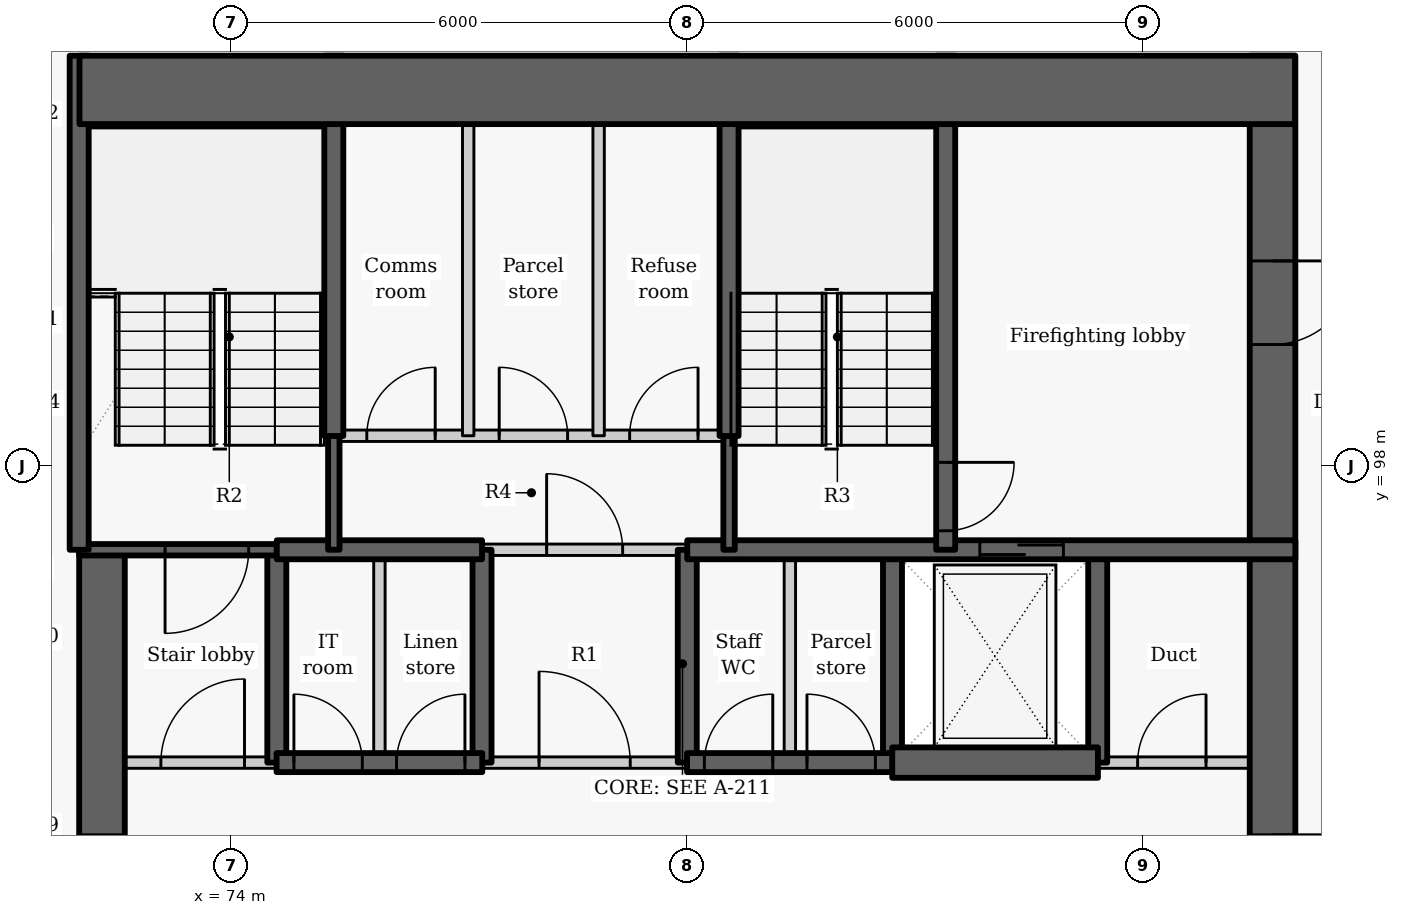
"""IFC4 building model, lengths in metres.
Left out: names, types, materials, properties, quantities, classifications, styles, units other than length and angle.
Written with IfcOpenShell. Run it as: python <this file> out.ifc"""

import sys

from ifc_helpers import new_model, si_unit, direction, frame, frame_2d, origin, place, context, subcontext, project, spatial, rectangle, extrude, element, fill, save


model = new_model("IFC4")
c1 = context("Model", 3, precision=1e-05, world=origin(), true_north=direction((0.0, 1.0)))
c2 = subcontext(c1, "Body", "Model", "MODEL_VIEW")
j1 = project(units=[si_unit("LENGTHUNIT", "METRE"), si_unit("PLANEANGLEUNIT", "RADIAN")], contexts=[c1])
p1 = place(None, origin())
s1 = spatial("IfcSite", under=j1, at=p1, CompositionType="ELEMENT")
p2 = place(p1, origin())
s2 = spatial("IfcBuilding", under=s1, at=p2, CompositionType="ELEMENT")
p3 = place(p2, frame((0.0, 0.0, 41.4)))
s3 = spatial("IfcBuildingStorey", under=s2, at=p3, CompositionType="ELEMENT", Elevation=41.4)
p4 = place(p3, frame((74.6, 94.1, -0.275), z_axis=(0.0, 0.0, 1.0), x_axis=(0.0, 1.0, 0.0)))
e1 = element("IfcWall", 1, at=p4, inside=s3, PredefinedType="SHEAR", context=c2, shape_type="SweptSolid", body=[
    extrude(rectangle(XDim=2.8, YDim=0.25, at=frame_2d((1.4, 0.0))), origin(), (0.0, 0.0, 1.0), 3.3),
])
p5 = place(p3, frame((72.3, 87.8, -0.275), z_axis=(0.0, 0.0, 1.0), x_axis=(0.0, 1.0, 0.0)))
e2 = element("IfcWall", 2, at=p5, inside=s3, PredefinedType="SHEAR", context=c2, shape_type="SweptSolid", body=[
    extrude(rectangle(XDim=9.1, YDim=0.6, at=frame_2d((4.55, 0.0))), origin(), (0.0, 0.0, 1.0), 3.3),
])
p6 = place(p5, frame((3.85, 0.0, 0.275)))
e3 = element("IfcOpeningElement", 3, at=p6, cuts=e2, PredefinedType="OPENING", context=c2, shape_type="SweptSolid", body=[
    extrude(rectangle(XDim=1.5, YDim=2.1, at=frame_2d((0.75, 1.05))), frame((0.0, 0.31, 0.0), z_axis=(0.0, -1.0, 0.0), x_axis=(1.0, 0.0, 0.0)), (0.0, 0.0, 1.0), 0.62),
])
for number, where, z_axis, x_axis in (
    (4, (77.3, 94.1, -0.275), (0.0, 0.0, 1.0), (0.0, 1.0, 0.0)),
    (5, (80.0, 94.1, -0.275), (0.0, 0.0, 1.0), (0.0, 1.0, 0.0)),
    (6, (82.7, 94.1, -0.275), (0.0, 0.0, 1.0), (0.0, 1.0, 0.0)),
    (7, (85.4, 94.1, -0.275), (0.0, 0.0, 1.0), (0.0, 1.0, 0.0)),
):
    element("IfcWall", number, at=place(p3, frame(where, z_axis=z_axis, x_axis=x_axis)), inside=s3, PredefinedType="SHEAR", context=c2, shape_type="SweptSolid", body=[
        extrude(rectangle(XDim=2.8, YDim=0.25, at=frame_2d((1.4, 0.0))), origin(), (0.0, 0.0, 1.0), 3.3),
    ])
p7 = place(p3, frame((87.7, 103.4, -0.275), z_axis=(0.0, 0.0, 1.0), x_axis=(0.0, -1.0, 0.0)))
e8 = element("IfcWall", 8, at=p7, inside=s3, PredefinedType="SHEAR", context=c2, shape_type="SweptSolid", body=[
    extrude(rectangle(XDim=15.6, YDim=0.6, at=frame_2d((7.8, 0.0))), origin(), (0.0, 0.0, 1.0), 3.3),
])
p8 = place(p7, frame((10.25, 0.0, 0.275)))
e9 = element("IfcOpeningElement", 9, at=p8, cuts=e8, PredefinedType="OPENING", context=c2, shape_type="SweptSolid", body=[
    extrude(rectangle(XDim=1.5, YDim=2.1, at=frame_2d((0.75, 1.05))), frame((0.0, 0.31, 0.0), z_axis=(0.0, -1.0, 0.0), x_axis=(1.0, 0.0, 0.0)), (0.0, 0.0, 1.0), 0.62),
])
p9 = place(p7, frame((2.7, 0.0, 0.275)))
e10 = element("IfcOpeningElement", 10, at=p9, cuts=e8, PredefinedType="OPENING", context=c2, shape_type="SweptSolid", body=[
    extrude(rectangle(XDim=1.1, YDim=2.1, at=frame_2d((0.55, 1.05))), frame((0.0, 0.31, 0.0), z_axis=(0.0, -1.0, 0.0), x_axis=(1.0, 0.0, 0.0)), (0.0, 0.0, 1.0), 0.62),
])
p10 = place(p3, frame((72.0, 94.1, 0.0), z_axis=(0.0, 0.0, 1.0), x_axis=(1.0, 0.0, 0.0)))
e11 = element("IfcWall", 11, at=p10, inside=s3, PredefinedType="PARTITIONING", context=c2, shape_type="SweptSolid", body=[
    extrude(rectangle(XDim=2.603, YDim=0.15, at=frame_2d((1.302, 0.0))), origin(), (0.0, 0.0, 1.0), 3.025),
])
p11 = place(p10, frame((1.075, 0.0, 0.0)))
e12 = element("IfcOpeningElement", 12, at=p11, cuts=e11, PredefinedType="OPENING", context=c2, shape_type="SweptSolid", body=[
    extrude(rectangle(XDim=1.1, YDim=2.1, at=frame_2d((0.55, 1.05))), frame((0.0, 0.085, 0.0), z_axis=(0.0, -1.0, 0.0), x_axis=(1.0, 0.0, 0.0)), (0.0, 0.0, 1.0), 0.17),
])
p12 = place(p3, frame((77.297, 94.1, 0.0), z_axis=(0.0, 0.0, 1.0), x_axis=(1.0, 0.0, 0.0)))
e13 = element("IfcWall", 13, at=p12, inside=s3, PredefinedType="PARTITIONING", context=c2, shape_type="SweptSolid", body=[
    extrude(rectangle(XDim=2.706, YDim=0.15, at=frame_2d((1.353, 0.0))), origin(), (0.0, 0.0, 1.0), 3.025),
])
p13 = place(p12, frame((0.753, 0.0, 0.0)))
e14 = element("IfcOpeningElement", 14, at=p13, cuts=e13, PredefinedType="OPENING", context=c2, shape_type="SweptSolid", body=[
    extrude(rectangle(XDim=1.2, YDim=2.1, at=frame_2d((0.6, 1.05))), frame((0.0, 0.085, 0.0), z_axis=(0.0, -1.0, 0.0), x_axis=(1.0, 0.0, 0.0)), (0.0, 0.0, 1.0), 0.17),
])
p14 = place(p3, frame((85.397, 94.1, 0.0), z_axis=(0.0, 0.0, 1.0), x_axis=(1.0, 0.0, 0.0)))
e15 = element("IfcWall", 15, at=p14, inside=s3, PredefinedType="PARTITIONING", context=c2, shape_type="SweptSolid", body=[
    extrude(rectangle(XDim=2.603, YDim=0.15, at=frame_2d((1.302, 0.0))), origin(), (0.0, 0.0, 1.0), 3.025),
])
p15 = place(p14, frame((0.528, 0.0, 0.0)))
e16 = element("IfcOpeningElement", 16, at=p15, cuts=e15, PredefinedType="OPENING", context=c2, shape_type="SweptSolid", body=[
    extrude(rectangle(XDim=0.9, YDim=2.1, at=frame_2d((0.45, 1.05))), frame((0.0, 0.085, 0.0), z_axis=(0.0, -1.0, 0.0), x_axis=(1.0, 0.0, 0.0)), (0.0, 0.0, 1.0), 0.17),
])
p16 = place(p3, frame((74.597, 94.1, -0.275), z_axis=(0.0, 0.0, 1.0), x_axis=(1.0, 0.0, 0.0)))
e17 = element("IfcWall", 17, at=p16, inside=s3, PredefinedType="SHEAR", context=c2, shape_type="SweptSolid", body=[
    extrude(rectangle(XDim=2.706, YDim=0.25, at=frame_2d((1.353, 0.0))), origin(), (0.0, 0.0, 1.0), 3.3),
])
p17 = place(p16, frame((0.228, 0.0, 0.275)))
e18 = element("IfcOpeningElement", 18, at=p17, cuts=e17, PredefinedType="OPENING", context=c2, shape_type="SweptSolid", body=[
    extrude(rectangle(XDim=0.9, YDim=2.1, at=frame_2d((0.45, 1.05))), frame((0.0, 0.135, 0.0), z_axis=(0.0, -1.0, 0.0), x_axis=(1.0, 0.0, 0.0)), (0.0, 0.0, 1.0), 0.27),
])
p18 = place(p16, frame((1.578, 0.0, 0.275)))
e19 = element("IfcOpeningElement", 19, at=p18, cuts=e17, PredefinedType="OPENING", context=c2, shape_type="SweptSolid", body=[
    extrude(rectangle(XDim=0.9, YDim=2.1, at=frame_2d((0.45, 1.05))), frame((0.0, 0.135, 0.0), z_axis=(0.0, -1.0, 0.0), x_axis=(1.0, 0.0, 0.0)), (0.0, 0.0, 1.0), 0.27),
])
p19 = place(p3, frame((79.997, 94.1, -0.275), z_axis=(0.0, 0.0, 1.0), x_axis=(1.0, 0.0, 0.0)))
e20 = element("IfcWall", 20, at=p19, inside=s3, PredefinedType="SHEAR", context=c2, shape_type="SweptSolid", body=[
    extrude(rectangle(XDim=2.706, YDim=0.25, at=frame_2d((1.353, 0.0))), origin(), (0.0, 0.0, 1.0), 3.3),
])
p20 = place(p19, frame((0.228, 0.0, 0.275)))
e21 = element("IfcOpeningElement", 21, at=p20, cuts=e20, PredefinedType="OPENING", context=c2, shape_type="SweptSolid", body=[
    extrude(rectangle(XDim=0.9, YDim=2.1, at=frame_2d((0.45, 1.05))), frame((0.0, 0.135, 0.0), z_axis=(0.0, -1.0, 0.0), x_axis=(1.0, 0.0, 0.0)), (0.0, 0.0, 1.0), 0.27),
])
p21 = place(p19, frame((1.578, 0.0, 0.275)))
e22 = element("IfcOpeningElement", 22, at=p21, cuts=e20, PredefinedType="OPENING", context=c2, shape_type="SweptSolid", body=[
    extrude(rectangle(XDim=0.9, YDim=2.1, at=frame_2d((0.45, 1.05))), frame((0.0, 0.135, 0.0), z_axis=(0.0, -1.0, 0.0), x_axis=(1.0, 0.0, 0.0)), (0.0, 0.0, 1.0), 0.27),
])
p22 = place(p3, frame((82.697, 94.1, -0.275), z_axis=(0.0, 0.0, 1.0), x_axis=(1.0, 0.0, 0.0)))
e23 = element("IfcWall", 23, at=p22, inside=s3, PredefinedType="SHEAR", context=c2, shape_type="SweptSolid", body=[
    extrude(rectangle(XDim=2.706, YDim=0.4, at=frame_2d((1.353, 0.0))), origin(), (0.0, 0.0, 1.0), 3.3),
])
p23 = place(p3, frame((74.6, 96.9, -0.275), z_axis=(0.0, 0.0, 1.0), x_axis=(-1.0, 0.0, 0.0)))
e24 = element("IfcWall", 24, at=p23, inside=s3, PredefinedType="SHEAR", context=c2, shape_type="SweptSolid", body=[
    extrude(rectangle(XDim=2.6, YDim=0.15, at=frame_2d((1.3, 0.0))), origin(), (0.0, 0.0, 1.0), 3.3),
])
p24 = place(p23, frame((0.37, 0.0, 0.275)))
e25 = element("IfcOpeningElement", 25, at=p24, cuts=e24, PredefinedType="OPENING", context=c2, shape_type="SweptSolid", body=[
    extrude(rectangle(XDim=1.1, YDim=2.1, at=frame_2d((0.55, 1.05))), frame((0.0, 0.085, 0.0), z_axis=(0.0, -1.0, 0.0), x_axis=(1.0, 0.0, 0.0)), (0.0, 0.0, 1.0), 0.17),
])
p25 = place(p3, frame((75.95, 94.1, 0.0), z_axis=(0.0, 0.0, 1.0), x_axis=(0.0, 1.0, 0.0)))
e26 = element("IfcWall", 26, at=p25, inside=s3, PredefinedType="PARTITIONING", context=c2, shape_type="SweptSolid", body=[
    extrude(rectangle(XDim=2.8, YDim=0.15, at=frame_2d((1.4, 0.0))), origin(), (0.0, 0.0, 1.0), 3.025),
])
p26 = place(p3, frame((74.6, 96.9, -0.275), z_axis=(0.0, 0.0, 1.0), x_axis=(1.0, 0.0, 0.0)))
e27 = element("IfcWall", 27, at=p26, inside=s3, PredefinedType="SHEAR", context=c2, shape_type="SweptSolid", body=[
    extrude(rectangle(XDim=2.7, YDim=0.25, at=frame_2d((1.35, 0.0))), origin(), (0.0, 0.0, 1.0), 3.3),
])
p27 = place(p3, frame((80.0, 96.9, -0.275), z_axis=(0.0, 0.0, 1.0), x_axis=(1.0, 0.0, 0.0)))
e28 = element("IfcWall", 28, at=p27, inside=s3, PredefinedType="SHEAR", context=c2, shape_type="SweptSolid", body=[
    extrude(rectangle(XDim=8.0, YDim=0.25, at=frame_2d((4.0, 0.0))), origin(), (0.0, 0.0, 1.0), 3.3),
])
p28 = place(p27, frame((3.849, 0.0, 0.275)))
e29 = element("IfcOpeningElement", 29, at=p28, cuts=e28, PredefinedType="OPENING", context=c2, shape_type="SweptSolid", body=[
    extrude(rectangle(XDim=1.1, YDim=2.1, at=frame_2d((0.55, 1.05))), frame((0.0, 0.135, 0.0), z_axis=(0.0, -1.0, 0.0), x_axis=(1.0, 0.0, 0.0)), (0.0, 0.0, 1.0), 0.27),
])
p29 = place(p3, frame((77.3, 96.9, 0.0), z_axis=(0.0, 0.0, 1.0), x_axis=(1.0, 0.0, 0.0)))
e30 = element("IfcWall", 30, at=p29, inside=s3, PredefinedType="PARTITIONING", context=c2, shape_type="SweptSolid", body=[
    extrude(rectangle(XDim=2.7, YDim=0.15, at=frame_2d((1.35, 0.0))), origin(), (0.0, 0.0, 1.0), 3.025),
])
p30 = place(p29, frame((0.85, 0.0, 0.0)))
e31 = element("IfcOpeningElement", 31, at=p30, cuts=e30, PredefinedType="OPENING", context=c2, shape_type="SweptSolid", body=[
    extrude(rectangle(XDim=1.0, YDim=2.1, at=frame_2d((0.5, 1.05))), frame((0.0, 0.085, 0.0), z_axis=(0.0, -1.0, 0.0), x_axis=(1.0, 0.0, 0.0)), (0.0, 0.0, 1.0), 0.17),
])
p31 = place(p3, frame((81.35, 94.1, 0.0), z_axis=(0.0, 0.0, 1.0), x_axis=(0.0, 1.0, 0.0)))
e32 = element("IfcWall", 32, at=p31, inside=s3, PredefinedType="PARTITIONING", context=c2, shape_type="SweptSolid", body=[
    extrude(rectangle(XDim=2.8, YDim=0.15, at=frame_2d((1.4, 0.0))), origin(), (0.0, 0.0, 1.0), 3.025),
])
p32 = place(p3, frame((75.35, 96.9, -0.275), z_axis=(0.0, 0.0, 1.0), x_axis=(0.0, 1.0, 0.0)))
e33 = element("IfcWall", 33, at=p32, inside=s3, PredefinedType="SHEAR", context=c2, shape_type="SweptSolid", body=[
    extrude(rectangle(XDim=1.503, YDim=0.15, at=frame_2d((0.751, 0.0))), origin(), (0.0, 0.0, 1.0), 3.3),
])
p33 = place(p3, frame((75.35, 98.397, -0.275), z_axis=(0.0, 0.0, 1.0), x_axis=(0.0, 1.0, 0.0)))
e34 = element("IfcWall", 34, at=p33, inside=s3, PredefinedType="SHEAR", context=c2, shape_type="SweptSolid", body=[
    extrude(rectangle(XDim=5.003, YDim=0.25, at=frame_2d((2.501, 0.0))), origin(), (0.0, 0.0, 1.0), 3.3),
])
p34 = place(p3, frame((72.0, 96.9, -0.275), z_axis=(0.0, 0.0, 1.0), x_axis=(0.0, 1.0, 0.0)))
e35 = element("IfcWall", 35, at=p34, inside=s3, PredefinedType="SHEAR", context=c2, shape_type="SweptSolid", body=[
    extrude(rectangle(XDim=6.5, YDim=0.25, at=frame_2d((3.25, 0.0))), origin(), (0.0, 0.0, 1.0), 3.3),
])
p35 = place(p3, frame((83.4, 103.4, -0.275), z_axis=(0.0, 0.0, 1.0), x_axis=(0.0, -1.0, 0.0)))
e36 = element("IfcWall", 36, at=p35, inside=s3, PredefinedType="SHEAR", context=c2, shape_type="SweptSolid", body=[
    extrude(rectangle(XDim=6.5, YDim=0.25, at=frame_2d((3.25, 0.0))), origin(), (0.0, 0.0, 1.0), 3.3),
])
p36 = place(p35, frame((5.35, 0.0, 0.275)))
e37 = element("IfcOpeningElement", 37, at=p36, cuts=e36, PredefinedType="OPENING", context=c2, shape_type="SweptSolid", body=[
    extrude(rectangle(XDim=0.9, YDim=2.1, at=frame_2d((0.45, 1.05))), frame((0.0, 0.135, 0.0), z_axis=(0.0, -1.0, 0.0), x_axis=(1.0, 0.0, 0.0)), (0.0, 0.0, 1.0), 0.27),
])
p37 = place(p3, frame((80.55, 96.9, -0.275), z_axis=(0.0, 0.0, 1.0), x_axis=(0.0, 1.0, 0.0)))
e38 = element("IfcWall", 38, at=p37, inside=s3, PredefinedType="SHEAR", context=c2, shape_type="SweptSolid", body=[
    extrude(rectangle(XDim=1.503, YDim=0.15, at=frame_2d((0.751, 0.0))), origin(), (0.0, 0.0, 1.0), 3.3),
])
p38 = place(p3, frame((80.55, 98.397, -0.275), z_axis=(0.0, 0.0, 1.0), x_axis=(0.0, 1.0, 0.0)))
e39 = element("IfcWall", 39, at=p38, inside=s3, PredefinedType="SHEAR", context=c2, shape_type="SweptSolid", body=[
    extrude(rectangle(XDim=5.003, YDim=0.25, at=frame_2d((2.501, 0.0))), origin(), (0.0, 0.0, 1.0), 3.3),
])
p39 = place(p3, frame((75.35, 98.4, 0.0), z_axis=(0.0, 0.0, 1.0), x_axis=(1.0, 0.0, 0.0)))
e40 = element("IfcWall", 40, at=p39, inside=s3, PredefinedType="PARTITIONING", context=c2, shape_type="SweptSolid", body=[
    extrude(rectangle(XDim=5.2, YDim=0.15, at=frame_2d((2.6, 0.0))), origin(), (0.0, 0.0, 1.0), 3.025),
])
p40 = place(p39, frame((0.434, 0.0, 0.0)))
e41 = element("IfcOpeningElement", 41, at=p40, cuts=e40, PredefinedType="OPENING", context=c2, shape_type="SweptSolid", body=[
    extrude(rectangle(XDim=0.9, YDim=2.1, at=frame_2d((0.45, 1.05))), frame((0.0, 0.085, 0.0), z_axis=(0.0, -1.0, 0.0), x_axis=(1.0, 0.0, 0.0)), (0.0, 0.0, 1.0), 0.17),
])
p41 = place(p39, frame((2.176, 0.0, 0.0)))
e42 = element("IfcOpeningElement", 42, at=p41, cuts=e40, PredefinedType="OPENING", context=c2, shape_type="SweptSolid", body=[
    extrude(rectangle(XDim=0.9, YDim=2.1, at=frame_2d((0.45, 1.05))), frame((0.0, 0.085, 0.0), z_axis=(0.0, -1.0, 0.0), x_axis=(1.0, 0.0, 0.0)), (0.0, 0.0, 1.0), 0.17),
])
p42 = place(p39, frame((3.892, 0.0, 0.0)))
e43 = element("IfcOpeningElement", 43, at=p42, cuts=e40, PredefinedType="OPENING", context=c2, shape_type="SweptSolid", body=[
    extrude(rectangle(XDim=0.9, YDim=2.1, at=frame_2d((0.45, 1.05))), frame((0.0, 0.085, 0.0), z_axis=(0.0, -1.0, 0.0), x_axis=(1.0, 0.0, 0.0)), (0.0, 0.0, 1.0), 0.17),
])
for number, where, z_axis, x_axis in (
    (44, (77.118, 98.4, 0.0), (0.0, 0.0, 1.0), (0.0, 1.0, 0.0)),
    (45, (78.834, 98.4, 0.0), (0.0, 0.0, 1.0), (0.0, 1.0, 0.0)),
):
    element("IfcWall", number, at=place(p3, frame(where, z_axis=z_axis, x_axis=x_axis)), inside=s3, PredefinedType="PARTITIONING", context=c2, shape_type="SweptSolid", body=[
        extrude(rectangle(XDim=5.0, YDim=0.15, at=frame_2d((2.5, 0.0))), origin(), (0.0, 0.0, 1.0), 3.025),
    ])
p43 = place(p3, frame((72.004, 102.95, -0.275), z_axis=(0.0, 0.0, 1.0), x_axis=(1.0, 0.0, 0.0)))
e46 = element("IfcWall", 46, at=p43, inside=s3, PredefinedType="SHEAR", context=c2, shape_type="SweptSolid", body=[
    extrude(rectangle(XDim=15.992, YDim=0.9, at=frame_2d((7.996, 0.0))), origin(), (0.0, 0.0, 1.0), 3.3),
])
p44 = place(p11, origin())
e47 = element("IfcDoor", 47, at=p44, inside=s3, OperationType="SINGLE_SWING_RIGHT", PredefinedType="DOOR", context=c2, shape_type="SweptSolid", body=[
    extrude(rectangle(XDim=1.1, YDim=2.1, at=frame_2d((0.55, 1.05))), frame((0.0, 0.025, 0.0), z_axis=(0.0, -1.0, 0.0), x_axis=(1.0, 0.0, 0.0)), (0.0, 0.0, 1.0), 0.05),
])
fill(e12, e47)
p45 = place(p17, origin())
e48 = element("IfcDoor", 48, at=p45, inside=s3, OperationType="SINGLE_SWING_LEFT", PredefinedType="DOOR", context=c2, shape_type="SweptSolid", body=[
    extrude(rectangle(XDim=0.9, YDim=2.1, at=frame_2d((0.45, 1.05))), frame((0.0, 0.025, 0.0), z_axis=(0.0, -1.0, 0.0), x_axis=(1.0, 0.0, 0.0)), (0.0, 0.0, 1.0), 0.05),
])
fill(e18, e48)
p46 = place(p18, origin())
e49 = element("IfcDoor", 49, at=p46, inside=s3, OperationType="SINGLE_SWING_RIGHT", PredefinedType="DOOR", context=c2, shape_type="SweptSolid", body=[
    extrude(rectangle(XDim=0.9, YDim=2.1, at=frame_2d((0.45, 1.05))), frame((0.0, 0.025, 0.0), z_axis=(0.0, -1.0, 0.0), x_axis=(1.0, 0.0, 0.0)), (0.0, 0.0, 1.0), 0.05),
])
fill(e19, e49)
p47 = place(p13, origin())
e50 = element("IfcDoor", 50, at=p47, inside=s3, OperationType="DOUBLE_DOOR_SINGLE_SWING", PredefinedType="DOOR", context=c2, shape_type="SweptSolid", body=[
    extrude(rectangle(XDim=1.2, YDim=2.1, at=frame_2d((0.6, 1.05))), frame((0.0, 0.025, 0.0), z_axis=(0.0, -1.0, 0.0), x_axis=(1.0, 0.0, 0.0)), (0.0, 0.0, 1.0), 0.05),
])
fill(e14, e50)
p48 = place(p20, origin())
e51 = element("IfcDoor", 51, at=p48, inside=s3, OperationType="SINGLE_SWING_RIGHT", PredefinedType="DOOR", context=c2, shape_type="SweptSolid", body=[
    extrude(rectangle(XDim=0.9, YDim=2.1, at=frame_2d((0.45, 1.05))), frame((0.0, 0.025, 0.0), z_axis=(0.0, -1.0, 0.0), x_axis=(1.0, 0.0, 0.0)), (0.0, 0.0, 1.0), 0.05),
])
fill(e21, e51)
p49 = place(p21, origin())
e52 = element("IfcDoor", 52, at=p49, inside=s3, OperationType="SINGLE_SWING_LEFT", PredefinedType="DOOR", context=c2, shape_type="SweptSolid", body=[
    extrude(rectangle(XDim=0.9, YDim=2.1, at=frame_2d((0.45, 1.05))), frame((0.0, 0.025, 0.0), z_axis=(0.0, -1.0, 0.0), x_axis=(1.0, 0.0, 0.0)), (0.0, 0.0, 1.0), 0.05),
])
fill(e22, e52)
p50 = place(p28, origin())
e53 = element("IfcDoor", 53, at=p50, inside=s3, OperationType="SLIDING_TO_LEFT", PredefinedType="DOOR", context=c2, shape_type="SweptSolid", body=[
    extrude(rectangle(XDim=1.1, YDim=2.1, at=frame_2d((0.55, 1.05))), frame((0.0, 0.025, 0.0), z_axis=(0.0, -1.0, 0.0), x_axis=(1.0, 0.0, 0.0)), (0.0, 0.0, 1.0), 0.05),
])
fill(e29, e53)
p51 = place(p15, origin())
e54 = element("IfcDoor", 54, at=p51, inside=s3, OperationType="SINGLE_SWING_RIGHT", PredefinedType="DOOR", context=c2, shape_type="SweptSolid", body=[
    extrude(rectangle(XDim=0.9, YDim=2.1, at=frame_2d((0.45, 1.05))), frame((0.0, 0.025, 0.0), z_axis=(0.0, -1.0, 0.0), x_axis=(1.0, 0.0, 0.0)), (0.0, 0.0, 1.0), 0.05),
])
fill(e16, e54)
p52 = place(p30, origin())
e55 = element("IfcDoor", 55, at=p52, inside=s3, OperationType="SINGLE_SWING_LEFT", PredefinedType="DOOR", context=c2, shape_type="SweptSolid", body=[
    extrude(rectangle(XDim=1.0, YDim=2.1, at=frame_2d((0.5, 1.05))), frame((0.0, 0.025, 0.0), z_axis=(0.0, -1.0, 0.0), x_axis=(1.0, 0.0, 0.0)), (0.0, 0.0, 1.0), 0.05),
])
fill(e31, e55)
p53 = place(p40, origin())
e56 = element("IfcDoor", 56, at=p53, inside=s3, OperationType="SINGLE_SWING_RIGHT", PredefinedType="DOOR", context=c2, shape_type="SweptSolid", body=[
    extrude(rectangle(XDim=0.9, YDim=2.1, at=frame_2d((0.45, 1.05))), frame((0.0, 0.025, 0.0), z_axis=(0.0, -1.0, 0.0), x_axis=(1.0, 0.0, 0.0)), (0.0, 0.0, 1.0), 0.05),
])
fill(e41, e56)
p54 = place(p41, origin())
e57 = element("IfcDoor", 57, at=p54, inside=s3, OperationType="SINGLE_SWING_LEFT", PredefinedType="DOOR", context=c2, shape_type="SweptSolid", body=[
    extrude(rectangle(XDim=0.9, YDim=2.1, at=frame_2d((0.45, 1.05))), frame((0.0, 0.025, 0.0), z_axis=(0.0, -1.0, 0.0), x_axis=(1.0, 0.0, 0.0)), (0.0, 0.0, 1.0), 0.05),
])
fill(e42, e57)
p55 = place(p42, origin())
e58 = element("IfcDoor", 58, at=p55, inside=s3, OperationType="SINGLE_SWING_RIGHT", PredefinedType="DOOR", context=c2, shape_type="SweptSolid", body=[
    extrude(rectangle(XDim=0.9, YDim=2.1, at=frame_2d((0.45, 1.05))), frame((0.0, 0.025, 0.0), z_axis=(0.0, -1.0, 0.0), x_axis=(1.0, 0.0, 0.0)), (0.0, 0.0, 1.0), 0.05),
])
fill(e43, e58)
p56 = place(p24, origin())
e59 = element("IfcDoor", 59, at=p56, inside=s3, OperationType="SINGLE_SWING_RIGHT", PredefinedType="DOOR", context=c2, shape_type="SweptSolid", body=[
    extrude(rectangle(XDim=1.1, YDim=2.1, at=frame_2d((0.55, 1.05))), frame((0.0, 0.025, 0.0), z_axis=(0.0, -1.0, 0.0), x_axis=(1.0, 0.0, 0.0)), (0.0, 0.0, 1.0), 0.05),
])
fill(e25, e59)
p57 = place(p36, origin())
e60 = element("IfcDoor", 60, at=p57, inside=s3, OperationType="SINGLE_SWING_LEFT", PredefinedType="DOOR", context=c2, shape_type="SweptSolid", body=[
    extrude(rectangle(XDim=0.9, YDim=2.1, at=frame_2d((0.45, 1.05))), frame((0.0, 0.025, 0.0), z_axis=(0.0, -1.0, 0.0), x_axis=(1.0, 0.0, 0.0)), (0.0, 0.0, 1.0), 0.05),
])
fill(e37, e60)
p58 = place(p6, origin())
e61 = element("IfcDoor", 61, at=p58, inside=s3, OperationType="DOUBLE_DOOR_SINGLE_SWING", PredefinedType="DOOR", context=c2, shape_type="SweptSolid", body=[
    extrude(rectangle(XDim=1.5, YDim=2.1, at=frame_2d((0.75, 1.05))), frame((0.0, 0.025, 0.0), z_axis=(0.0, -1.0, 0.0), x_axis=(1.0, 0.0, 0.0)), (0.0, 0.0, 1.0), 0.05),
])
fill(e3, e61)
p59 = place(p9, origin())
e62 = element("IfcDoor", 62, at=p59, inside=s3, OperationType="SINGLE_SWING_LEFT", PredefinedType="DOOR", context=c2, shape_type="SweptSolid", body=[
    extrude(rectangle(XDim=1.1, YDim=2.1, at=frame_2d((0.55, 1.05))), frame((0.0, 0.025, 0.0), z_axis=(0.0, -1.0, 0.0), x_axis=(1.0, 0.0, 0.0)), (0.0, 0.0, 1.0), 0.05),
])
fill(e10, e62)
save(model, sys.argv[1])
